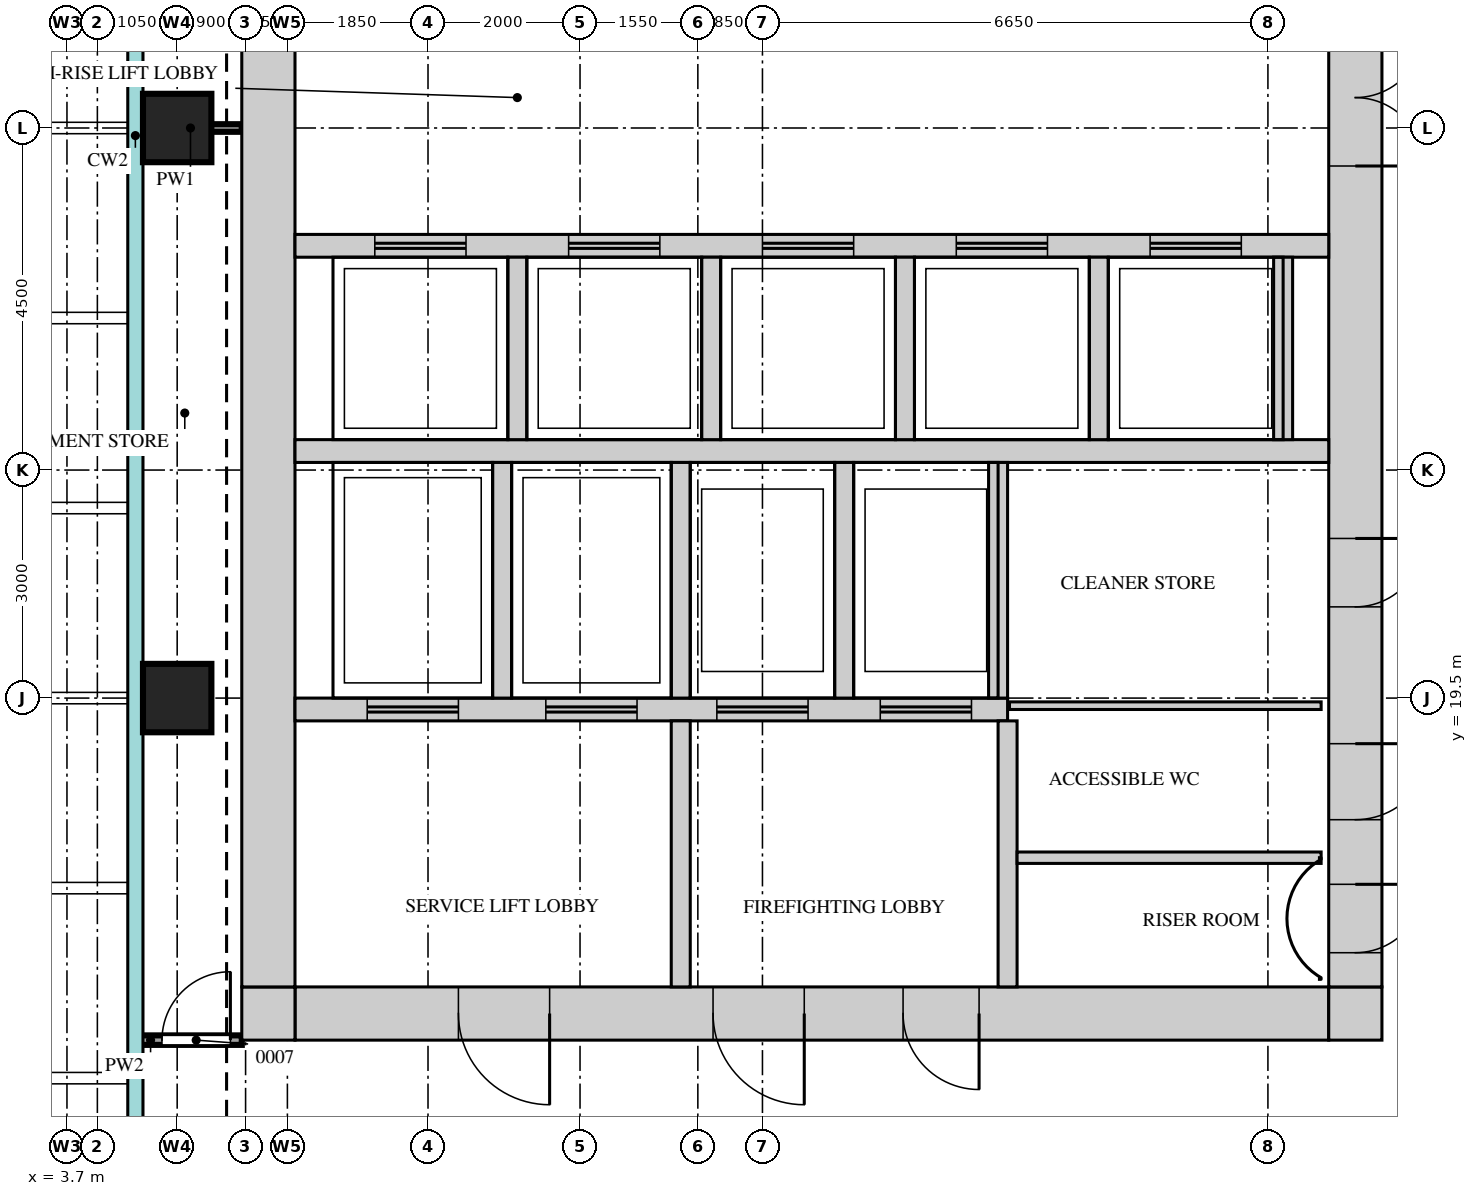
"""IFC4 building model, lengths in metres.
Left out: names, types, materials, properties, quantities, classifications, styles, units other than length and angle.
Written with IfcOpenShell. Run it as: python <this file> out.ifc"""

import sys

from ifc_helpers import new_model, si_unit, direction, frame, frame_2d, origin, origin_2d, place, context, subcontext, project, spatial, rectangle, extrude, source, transform, mapped, element, fill, save


model = new_model("IFC4")
c1 = context("Model", 3, precision=1e-05, world=origin(), true_north=direction((0.0, 1.0)))
c2 = subcontext(c1, "Body", "Model", "MODEL_VIEW")
j1 = project(units=[si_unit("LENGTHUNIT", "METRE"), si_unit("PLANEANGLEUNIT", "RADIAN")], contexts=[c1])
p1 = place(None, origin())
s1 = spatial("IfcSite", under=j1, at=p1, CompositionType="ELEMENT")
p2 = place(p1, origin())
s2 = spatial("IfcBuilding", under=s1, at=p2, CompositionType="ELEMENT")
p3 = place(p2, frame((0.0, 0.0, 234.2)))
s3 = spatial("IfcBuildingStorey", under=s2, at=p3, CompositionType="ELEMENT", Elevation=234.2)
m1 = source(origin(), c2, "Body", "SweptSolid", [
    extrude(rectangle(XDim=13.6, YDim=0.7, at=frame_2d((6.8, 0.0))), origin(), (0.0, 0.0, 1.0), 3.75),
])
p4 = place(p3, frame((6.7, 15.35, 0.0), z_axis=(0.0, 0.0, 1.0), x_axis=(1.0, 0.0, 0.0)))
e1 = element("IfcWall", 1, at=p4, inside=s3, PredefinedType="SHEAR", context=c2, shape_type="MappedRepresentation", body=[
    mapped(m1, transform((0.0, 0.0, 0.0))),
])
m2 = source(origin(), c2, "Body", "SweptSolid", [
    extrude(rectangle(XDim=1.2, YDim=2.1, at=frame_2d((0.6, 1.05))), frame((0.0, 0.36, 0.0), z_axis=(0.0, -1.0, 0.0), x_axis=(1.0, 0.0, 0.0)), (0.0, 0.0, 1.0), 0.72),
])
p5 = place(p4, frame((5.5, 0.0, 0.0)))
e2 = element("IfcOpeningElement", 2, at=p5, cuts=e1, PredefinedType="OPENING", context=c2, shape_type="MappedRepresentation", body=[
    mapped(m2, transform((0.0, 0.0, 0.0))),
])
p6 = place(p4, frame((2.15, 0.0, 0.0)))
e3 = element("IfcOpeningElement", 3, at=p6, cuts=e1, PredefinedType="OPENING", context=c2, shape_type="MappedRepresentation", body=[
    mapped(m2, transform((0.0, 0.0, 0.0))),
])
m3 = source(origin(), c2, "Body", "SweptSolid", [
    extrude(rectangle(XDim=1.0, YDim=2.1, at=frame_2d((0.5, 1.05))), frame((0.0, 0.36, 0.0), z_axis=(0.0, -1.0, 0.0), x_axis=(1.0, 0.0, 0.0)), (0.0, 0.0, 1.0), 0.72),
])
p7 = place(p4, frame((8.0, 0.0, 0.0)))
e4 = element("IfcOpeningElement", 4, at=p7, cuts=e1, PredefinedType="OPENING", context=c2, shape_type="MappedRepresentation", body=[
    mapped(m3, transform((0.0, 0.0, 0.0))),
])
m4 = source(origin(), c2, "Body", "SweptSolid", [
    extrude(rectangle(XDim=0.7, YDim=0.7, at=frame_2d((0.35, 0.0))), origin(), (0.0, 0.0, 1.0), 3.75),
])
for number, where, z_axis, x_axis in (
    (5, (20.3, 15.35, 0.0), (0.0, 0.0, 1.0), (1.0, 0.0, 0.0)),
    (6, (6.0, 15.35, 0.0), (0.0, 0.0, 1.0), (1.0, 0.0, 0.0)),
):
    element("IfcWall", number, at=place(p3, frame(where, z_axis=z_axis, x_axis=x_axis)), inside=s3, PredefinedType="SHEAR", context=c2, shape_type="MappedRepresentation", body=[
        mapped(m4, transform((0.0, 0.0, 0.0))),
    ])
m5 = source(origin(), c2, "Body", "SweptSolid", [
    extrude(rectangle(XDim=22.6, YDim=0.7, at=frame_2d((11.3, 0.0))), origin(), (0.0, 0.0, 1.0), 3.75),
])
p8 = place(p3, frame((20.65, 15.7, 0.0), z_axis=(0.0, 0.0, 1.0), x_axis=(0.0, 1.0, 0.0)))
e7 = element("IfcWall", 7, at=p8, inside=s3, PredefinedType="SHEAR", context=c2, shape_type="MappedRepresentation", body=[
    mapped(m5, transform((0.0, 0.0, 0.0))),
])
m6 = source(origin(), c2, "Body", "SweptSolid", [
    extrude(rectangle(XDim=1.8, YDim=2.1, at=frame_2d((0.9, 1.05))), frame((0.0, 0.36, 0.0), z_axis=(0.0, -1.0, 0.0), x_axis=(1.0, 0.0, 0.0)), (0.0, 0.0, 1.0), 0.72),
])
p9 = place(p8, frame((10.8, 0.0, 0.0)))
e8 = element("IfcOpeningElement", 8, at=p9, cuts=e7, PredefinedType="OPENING", context=c2, shape_type="MappedRepresentation", body=[
    mapped(m6, transform((0.0, 0.0, 0.0))),
])
m7 = source(origin(), c2, "Body", "SweptSolid", [
    extrude(rectangle(XDim=0.9, YDim=2.1, at=frame_2d((0.45, 1.05))), frame((0.0, 0.36, 0.0), z_axis=(0.0, -1.0, 0.0), x_axis=(1.0, 0.0, 0.0)), (0.0, 0.0, 1.0), 0.72),
])
p10 = place(p8, frame((0.45, 0.0, 0.0)))
e9 = element("IfcOpeningElement", 9, at=p10, cuts=e7, PredefinedType="OPENING", context=c2, shape_type="MappedRepresentation", body=[
    mapped(m7, transform((0.0, 0.0, 0.0))),
])
p11 = place(p8, frame((2.2, 0.0, 0.0)))
e10 = element("IfcOpeningElement", 10, at=p11, cuts=e7, PredefinedType="OPENING", context=c2, shape_type="MappedRepresentation", body=[
    mapped(m3, transform((0.0, 0.0, 0.0))),
])
p12 = place(p8, frame((5.0, 0.0, 0.0)))
e11 = element("IfcOpeningElement", 11, at=p12, cuts=e7, PredefinedType="OPENING", context=c2, shape_type="MappedRepresentation", body=[
    mapped(m7, transform((0.0, 0.0, 0.0))),
])
p13 = place(p3, frame((6.35, 15.7, 0.0), z_axis=(0.0, 0.0, 1.0), x_axis=(0.0, 1.0, 0.0)))
e12 = element("IfcWall", 12, at=p13, inside=s3, PredefinedType="SHEAR", context=c2, shape_type="MappedRepresentation", body=[
    mapped(m5, transform((0.0, 0.0, 0.0))),
])
m8 = source(origin(), c2, "Body", "SweptSolid", [
    extrude(rectangle(XDim=13.6, YDim=0.3, at=frame_2d((6.8, 0.0))), origin(), (0.0, 0.0, 1.0), 3.75),
])
p14 = place(p3, frame((6.7, 22.75, 0.0), z_axis=(0.0, 0.0, 1.0), x_axis=(1.0, 0.0, 0.0)))
e13 = element("IfcWall", 13, at=p14, inside=s3, PredefinedType="STANDARD", context=c2, shape_type="MappedRepresentation", body=[
    mapped(m8, transform((0.0, 0.0, 0.0))),
])
m9 = source(origin(), c2, "Body", "SweptSolid", [
    extrude(rectangle(XDim=9.375, YDim=0.3, at=frame_2d((4.688, 0.0))), origin(), (0.0, 0.0, 1.0), 3.75),
])
p15 = place(p3, frame((6.7, 19.35, 0.0), z_axis=(0.0, 0.0, 1.0), x_axis=(1.0, 0.0, 0.0)))
e14 = element("IfcWall", 14, at=p15, inside=s3, PredefinedType="STANDARD", context=c2, shape_type="MappedRepresentation", body=[
    mapped(m9, transform((0.0, 0.0, 0.0))),
])
m10 = source(origin(), c2, "Body", "SweptSolid", [
    extrude(rectangle(XDim=1.2, YDim=2.1, at=frame_2d((0.6, 1.05))), frame((0.0, 0.16, 0.0), z_axis=(0.0, -1.0, 0.0), x_axis=(1.0, 0.0, 0.0)), (0.0, 0.0, 1.0), 0.32),
])
p16 = place(p15, frame((0.95, 0.0, 0.0)))
e15 = element("IfcOpeningElement", 15, at=p16, cuts=e14, PredefinedType="OPENING", context=c2, shape_type="MappedRepresentation", body=[
    mapped(m10, transform((0.0, 0.0, 0.0))),
])
p17 = place(p15, frame((3.3, 0.0, 0.0)))
e16 = element("IfcOpeningElement", 16, at=p17, cuts=e14, PredefinedType="OPENING", context=c2, shape_type="MappedRepresentation", body=[
    mapped(m10, transform((0.0, 0.0, 0.0))),
])
p18 = place(p15, frame((5.55, 0.0, 0.0)))
e17 = element("IfcOpeningElement", 17, at=p18, cuts=e14, PredefinedType="OPENING", context=c2, shape_type="MappedRepresentation", body=[
    mapped(m10, transform((0.0, 0.0, 0.0))),
])
p19 = place(p15, frame((7.7, 0.0, 0.0)))
e18 = element("IfcOpeningElement", 18, at=p19, cuts=e14, PredefinedType="OPENING", context=c2, shape_type="MappedRepresentation", body=[
    mapped(m10, transform((0.0, 0.0, 0.0))),
])
p20 = place(p3, frame((6.7, 25.45, 0.0), z_axis=(0.0, 0.0, 1.0), x_axis=(1.0, 0.0, 0.0)))
e19 = element("IfcWall", 19, at=p20, inside=s3, PredefinedType="STANDARD", context=c2, shape_type="MappedRepresentation", body=[
    mapped(m8, transform((0.0, 0.0, 0.0))),
])
p21 = place(p20, frame((1.05, 0.0, 0.0)))
e20 = element("IfcOpeningElement", 20, at=p21, cuts=e19, PredefinedType="OPENING", context=c2, shape_type="MappedRepresentation", body=[
    mapped(m10, transform((0.0, 0.0, 0.0))),
])
p22 = place(p20, frame((3.6, 0.0, 0.0)))
e21 = element("IfcOpeningElement", 21, at=p22, cuts=e19, PredefinedType="OPENING", context=c2, shape_type="MappedRepresentation", body=[
    mapped(m10, transform((0.0, 0.0, 0.0))),
])
p23 = place(p20, frame((6.15, 0.0, 0.0)))
e22 = element("IfcOpeningElement", 22, at=p23, cuts=e19, PredefinedType="OPENING", context=c2, shape_type="MappedRepresentation", body=[
    mapped(m10, transform((0.0, 0.0, 0.0))),
])
p24 = place(p20, frame((8.7, 0.0, 0.0)))
e23 = element("IfcOpeningElement", 23, at=p24, cuts=e19, PredefinedType="OPENING", context=c2, shape_type="MappedRepresentation", body=[
    mapped(m10, transform((0.0, 0.0, 0.0))),
])
p25 = place(p20, frame((11.25, 0.0, 0.0)))
e24 = element("IfcOpeningElement", 24, at=p25, cuts=e19, PredefinedType="OPENING", context=c2, shape_type="MappedRepresentation", body=[
    mapped(m10, transform((0.0, 0.0, 0.0))),
])
m11 = source(origin(), c2, "Body", "SweptSolid", [
    extrude(rectangle(XDim=3.1, YDim=0.25, at=frame_2d((1.55, 0.0))), origin(), (0.0, 0.0, 1.0), 3.75),
])
for number, where, z_axis, x_axis in (
    (25, (9.425, 19.5, 0.0), (0.0, 0.0, 1.0), (0.0, 1.0, 0.0)),
    (26, (11.775, 19.5, 0.0), (0.0, 0.0, 1.0), (0.0, 1.0, 0.0)),
    (27, (13.925, 19.5, 0.0), (0.0, 0.0, 1.0), (0.0, 1.0, 0.0)),
    (28, (15.95, 19.5, 0.0), (0.0, 0.0, 1.0), (0.0, 1.0, 0.0)),
):
    element("IfcWall", number, at=place(p3, frame(where, z_axis=z_axis, x_axis=x_axis)), inside=s3, PredefinedType="STANDARD", context=c2, shape_type="MappedRepresentation", body=[
        mapped(m11, transform((0.0, 0.0, 0.0))),
    ])
m12 = source(origin(), c2, "Body", "SweptSolid", [
    extrude(rectangle(XDim=2.4, YDim=0.25, at=frame_2d((1.2, 0.0))), origin(), (0.0, 0.0, 1.0), 3.75),
])
for number, where, z_axis, x_axis in (
    (29, (17.275, 22.9, 0.0), (0.0, 0.0, 1.0), (0.0, 1.0, 0.0)),
    (30, (19.7, 22.9, 0.0), (0.0, 0.0, 1.0), (0.0, 1.0, 0.0)),
    (31, (9.625, 22.9, 0.0), (0.0, 0.0, 1.0), (0.0, 1.0, 0.0)),
    (32, (12.175, 22.9, 0.0), (0.0, 0.0, 1.0), (0.0, 1.0, 0.0)),
    (33, (14.725, 22.9, 0.0), (0.0, 0.0, 1.0), (0.0, 1.0, 0.0)),
):
    element("IfcWall", number, at=place(p3, frame(where, z_axis=z_axis, x_axis=x_axis)), inside=s3, PredefinedType="STANDARD", context=c2, shape_type="MappedRepresentation", body=[
        mapped(m12, transform((0.0, 0.0, 0.0))),
    ])
m13 = source(origin(), c2, "Body", "SweptSolid", [
    extrude(rectangle(XDim=3.5, YDim=0.25, at=frame_2d((1.75, 0.0))), origin(), (0.0, 0.0, 1.0), 3.75),
])
for number, where, z_axis, x_axis in (
    (34, (16.075, 15.7, 0.0), (0.0, 0.0, 1.0), (0.0, 1.0, 0.0)),
    (35, (11.775, 15.7, 0.0), (0.0, 0.0, 1.0), (0.0, 1.0, 0.0)),
):
    element("IfcWall", number, at=place(p3, frame(where, z_axis=z_axis, x_axis=x_axis)), inside=s3, PredefinedType="STANDARD", context=c2, shape_type="MappedRepresentation", body=[
        mapped(m13, transform((0.0, 0.0, 0.0))),
    ])
m14 = source(origin(), c2, "Body", "SweptSolid", [
    extrude(rectangle(XDim=0.9, YDim=0.9, at=origin_2d()), origin(), (0.0, 0.0, 1.0), 3.75),
])
for number, where, z_axis, x_axis in (
    (36, (5.15, 19.5, 0.0), (0.0, 0.0, 1.0), (1.0, 0.0, 0.0)),
    (37, (5.15, 27.0, 0.0), (0.0, 0.0, 1.0), (1.0, 0.0, 0.0)),
):
    element("IfcColumn", number, at=place(p3, frame(where, z_axis=z_axis, x_axis=x_axis)), inside=s3, PredefinedType="COLUMN", context=c2, shape_type="MappedRepresentation", body=[
        mapped(m14, transform((0.0, 0.0, 0.0))),
    ])
m15 = source(origin(), c2, "Body", "SweptSolid", [
    extrude(rectangle(XDim=1.35, YDim=0.125, at=frame_2d((0.675, 0.0))), origin(), (0.0, 0.0, 1.0), 3.8),
])
p26 = place(p3, frame((4.65, 15.0, 0.0), z_axis=(0.0, 0.0, 1.0), x_axis=(1.0, 0.0, 0.0)))
e38 = element("IfcWall", 38, at=p26, inside=s3, PredefinedType="PARTITIONING", context=c2, shape_type="MappedRepresentation", body=[
    mapped(m15, transform((0.0, 0.0, 0.0))),
])
m16 = source(origin(), c2, "Body", "SweptSolid", [
    extrude(rectangle(XDim=0.9, YDim=2.1, at=frame_2d((0.45, 1.05))), frame((0.0, 0.073, 0.0), z_axis=(0.0, -1.0, 0.0), x_axis=(1.0, 0.0, 0.0)), (0.0, 0.0, 1.0), 0.145),
])
p27 = place(p26, frame((0.3, 0.0, 0.0)))
e39 = element("IfcOpeningElement", 39, at=p27, cuts=e38, PredefinedType="OPENING", context=c2, shape_type="MappedRepresentation", body=[
    mapped(m16, transform((0.0, 0.0, 0.0))),
])
m17 = source(origin(), c2, "Body", "SweptSolid", [
    extrude(rectangle(XDim=4.0, YDim=0.15, at=frame_2d((2.0, 0.0))), origin(), (0.0, 0.0, 1.0), 3.8),
])
p28 = place(p3, frame((16.2, 17.4, 0.0), z_axis=(0.0, 0.0, 1.0), x_axis=(1.0, 0.0, 0.0)))
e40 = element("IfcWall", 40, at=p28, inside=s3, PredefinedType="PARTITIONING", context=c2, shape_type="MappedRepresentation", body=[
    mapped(m17, transform((0.0, 0.0, 0.0))),
])
m18 = source(origin(), c2, "Body", "SweptSolid", [
    extrude(rectangle(XDim=4.1, YDim=0.1, at=frame_2d((2.05, 0.0))), origin(), (0.0, 0.0, 1.0), 3.8),
])
p29 = place(p3, frame((16.1, 19.4, 0.0), z_axis=(0.0, 0.0, 1.0), x_axis=(1.0, 0.0, 0.0)))
e41 = element("IfcWall", 41, at=p29, inside=s3, PredefinedType="PARTITIONING", context=c2, shape_type="MappedRepresentation", body=[
    mapped(m18, transform((0.0, 0.0, 0.0))),
])
m19 = source(origin(), c2, "Body", "SweptSolid", [
    extrude(rectangle(XDim=1.35, YDim=0.1, at=frame_2d((0.675, 0.0))), origin(), (0.0, 0.0, 1.0), 3.8),
])
p30 = place(p3, frame((4.65, 27.0, 0.0), z_axis=(0.0, 0.0, 1.0), x_axis=(1.0, 0.0, 0.0)))
e42 = element("IfcWall", 42, at=p30, inside=s3, PredefinedType="PARTITIONING", context=c2, shape_type="MappedRepresentation", body=[
    mapped(m19, transform((0.0, 0.0, 0.0))),
])
m20 = source(origin(), c2, "Body", "SweptSolid", [
    extrude(rectangle(XDim=1.8, YDim=2.1, at=frame_2d((0.9, 1.05))), frame((0.0, 0.3, 0.0), z_axis=(0.0, -1.0, 0.0), x_axis=(1.0, 0.0, 0.0)), (0.0, 0.0, 1.0), 0.6),
])
p31 = place(p9, origin())
e43 = element("IfcDoor", 43, at=p31, inside=s3, OperationType="DOUBLE_DOOR_SINGLE_SWING", PredefinedType="DOOR", context=c2, shape_type="MappedRepresentation", body=[
    mapped(m20, transform((0.0, 0.0, 0.0))),
])
fill(e8, e43)
m21 = source(origin(), c2, "Body", "SweptSolid", [
    extrude(rectangle(XDim=0.9, YDim=2.1, at=frame_2d((0.45, 1.05))), frame((0.0, 0.3, 0.0), z_axis=(0.0, -1.0, 0.0), x_axis=(1.0, 0.0, 0.0)), (0.0, 0.0, 1.0), 0.6),
])
p32 = place(p10, origin())
e44 = element("IfcDoor", 44, at=p32, inside=s3, OperationType="SINGLE_SWING_RIGHT", PredefinedType="DOOR", context=c2, shape_type="MappedRepresentation", body=[
    mapped(m21, transform((0.0, 0.0, 0.0))),
])
fill(e9, e44)
m22 = source(origin(), c2, "Body", "SweptSolid", [
    extrude(rectangle(XDim=1.0, YDim=2.1, at=frame_2d((0.5, 1.05))), frame((0.0, 0.3, 0.0), z_axis=(0.0, -1.0, 0.0), x_axis=(1.0, 0.0, 0.0)), (0.0, 0.0, 1.0), 0.6),
])
p33 = place(p11, origin())
e45 = element("IfcDoor", 45, at=p33, inside=s3, OperationType="SINGLE_SWING_RIGHT", PredefinedType="DOOR", context=c2, shape_type="MappedRepresentation", body=[
    mapped(m22, transform((0.0, 0.0, 0.0))),
])
fill(e10, e45)
p34 = place(p12, origin())
e46 = element("IfcDoor", 46, at=p34, inside=s3, OperationType="SINGLE_SWING_RIGHT", PredefinedType="DOOR", context=c2, shape_type="MappedRepresentation", body=[
    mapped(m21, transform((0.0, 0.0, 0.0))),
])
fill(e11, e46)
m23 = source(origin(), c2, "Body", "SweptSolid", [
    extrude(rectangle(XDim=1.2, YDim=2.1, at=frame_2d((0.6, 1.05))), frame((0.0, 0.3, 0.0), z_axis=(0.0, -1.0, 0.0), x_axis=(1.0, 0.0, 0.0)), (0.0, 0.0, 1.0), 0.6),
])
p35 = place(p5, origin())
e47 = element("IfcDoor", 47, at=p35, inside=s3, OperationType="SINGLE_SWING_RIGHT", PredefinedType="DOOR", context=c2, shape_type="MappedRepresentation", body=[
    mapped(m23, transform((0.0, 0.0, 0.0))),
])
fill(e2, e47)
p36 = place(p6, origin())
e48 = element("IfcDoor", 48, at=p36, inside=s3, OperationType="SINGLE_SWING_RIGHT", PredefinedType="DOOR", context=c2, shape_type="MappedRepresentation", body=[
    mapped(m23, transform((0.0, 0.0, 0.0))),
])
fill(e3, e48)
p37 = place(p7, origin())
e49 = element("IfcDoor", 49, at=p37, inside=s3, OperationType="SINGLE_SWING_RIGHT", PredefinedType="DOOR", context=c2, shape_type="MappedRepresentation", body=[
    mapped(m22, transform((0.0, 0.0, 0.0))),
])
fill(e4, e49)
m24 = source(origin(), c2, "Body", "SweptSolid", [
    extrude(rectangle(XDim=0.9, YDim=2.1, at=frame_2d((0.45, 1.05))), frame((0.0, 0.025, 0.0), z_axis=(0.0, -1.0, 0.0), x_axis=(1.0, 0.0, 0.0)), (0.0, 0.0, 1.0), 0.05),
])
p38 = place(p27, origin())
e50 = element("IfcDoor", 50, at=p38, inside=s3, OperationType="SINGLE_SWING_LEFT", PredefinedType="DOOR", context=c2, shape_type="MappedRepresentation", body=[
    mapped(m24, transform((0.0, 0.0, 0.0))),
])
fill(e39, e50)
m25 = source(origin(), c2, "Body", "SweptSolid", [
    extrude(rectangle(XDim=1.2, YDim=2.1, at=frame_2d((0.6, 1.05))), frame((0.0, 0.025, 0.0), z_axis=(0.0, -1.0, 0.0), x_axis=(1.0, 0.0, 0.0)), (0.0, 0.0, 1.0), 0.05),
])
p39 = place(p21, origin())
e51 = element("IfcDoor", 51, at=p39, inside=s3, OperationType="DOUBLE_DOOR_SLIDING", PredefinedType="DOOR", context=c2, shape_type="MappedRepresentation", body=[
    mapped(m25, transform((0.0, 0.0, 0.0))),
])
fill(e20, e51)
p40 = place(p22, origin())
e52 = element("IfcDoor", 52, at=p40, inside=s3, OperationType="DOUBLE_DOOR_SLIDING", PredefinedType="DOOR", context=c2, shape_type="MappedRepresentation", body=[
    mapped(m25, transform((0.0, 0.0, 0.0))),
])
fill(e21, e52)
p41 = place(p23, origin())
e53 = element("IfcDoor", 53, at=p41, inside=s3, OperationType="DOUBLE_DOOR_SLIDING", PredefinedType="DOOR", context=c2, shape_type="MappedRepresentation", body=[
    mapped(m25, transform((0.0, 0.0, 0.0))),
])
fill(e22, e53)
p42 = place(p24, origin())
e54 = element("IfcDoor", 54, at=p42, inside=s3, OperationType="DOUBLE_DOOR_SLIDING", PredefinedType="DOOR", context=c2, shape_type="MappedRepresentation", body=[
    mapped(m25, transform((0.0, 0.0, 0.0))),
])
fill(e23, e54)
p43 = place(p25, origin())
e55 = element("IfcDoor", 55, at=p43, inside=s3, OperationType="DOUBLE_DOOR_SLIDING", PredefinedType="DOOR", context=c2, shape_type="MappedRepresentation", body=[
    mapped(m25, transform((0.0, 0.0, 0.0))),
])
fill(e24, e55)
p44 = place(p16, origin())
e56 = element("IfcDoor", 56, at=p44, inside=s3, OperationType="DOUBLE_DOOR_SLIDING", PredefinedType="DOOR", context=c2, shape_type="MappedRepresentation", body=[
    mapped(m25, transform((0.0, 0.0, 0.0))),
])
fill(e15, e56)
p45 = place(p17, origin())
e57 = element("IfcDoor", 57, at=p45, inside=s3, OperationType="DOUBLE_DOOR_SLIDING", PredefinedType="DOOR", context=c2, shape_type="MappedRepresentation", body=[
    mapped(m25, transform((0.0, 0.0, 0.0))),
])
fill(e16, e57)
p46 = place(p18, origin())
e58 = element("IfcDoor", 58, at=p46, inside=s3, OperationType="DOUBLE_DOOR_SLIDING", PredefinedType="DOOR", context=c2, shape_type="MappedRepresentation", body=[
    mapped(m25, transform((0.0, 0.0, 0.0))),
])
fill(e17, e58)
p47 = place(p19, origin())
e59 = element("IfcDoor", 59, at=p47, inside=s3, OperationType="DOUBLE_DOOR_SLIDING", PredefinedType="DOOR", context=c2, shape_type="MappedRepresentation", body=[
    mapped(m25, transform((0.0, 0.0, 0.0))),
])
fill(e18, e59)
save(model, sys.argv[1])
